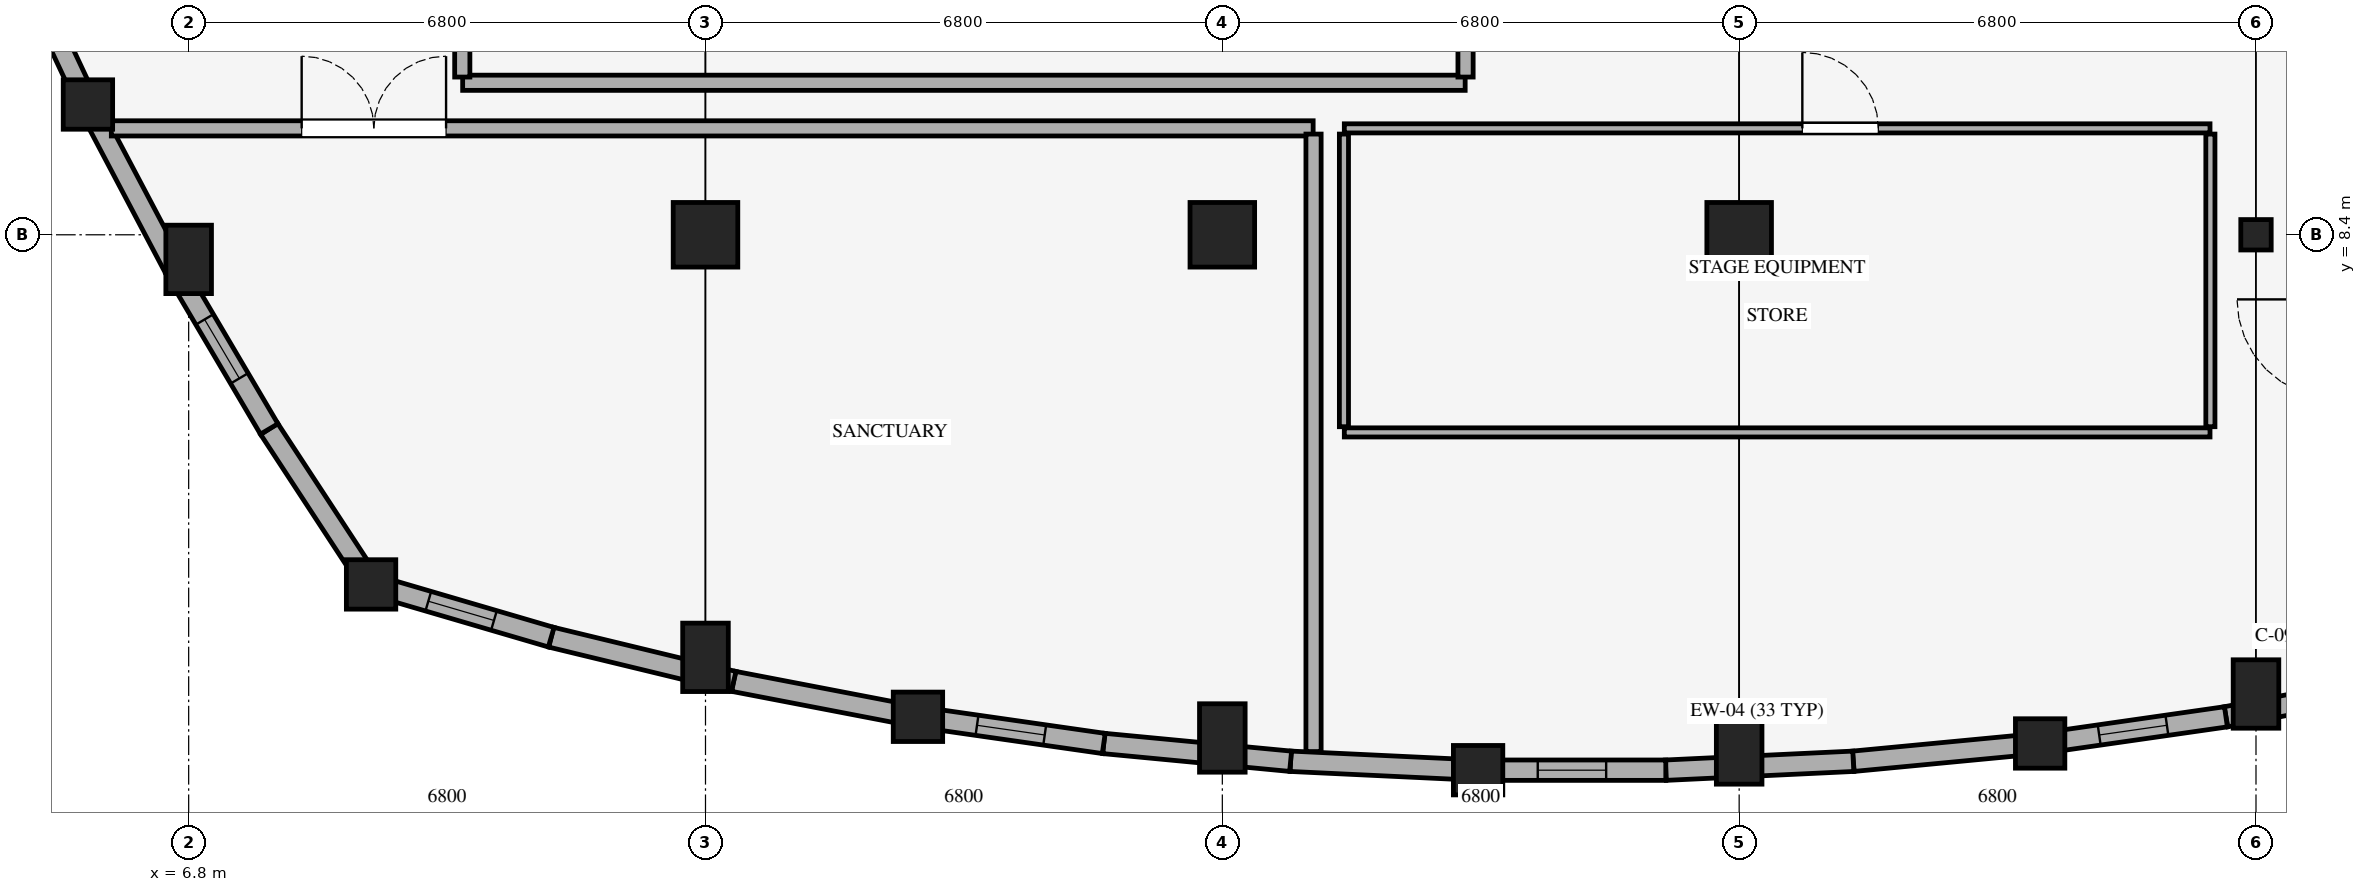
"""IFC4 building model, lengths in metres.
Left out: names, types, materials, properties, quantities, classifications, styles, units other than length and angle.
Written with IfcOpenShell. Run it as: python <this file> out.ifc"""

import sys

from ifc_helpers import new_model, si_unit, direction, frame, frame_2d, origin, origin_2d, place, context, subcontext, project, spatial, rectangle, circle, i_section, extrude, element, fill, save


model = new_model("IFC4")
c1 = context("Model", 3, precision=1e-05, world=origin(), true_north=direction((0.0, 1.0)))
c2 = subcontext(c1, "Body", "Model", "MODEL_VIEW")
j1 = project(units=[si_unit("LENGTHUNIT", "METRE"), si_unit("PLANEANGLEUNIT", "RADIAN")], contexts=[c1])
p1 = place(None, origin())
s1 = spatial("IfcSite", under=j1, at=p1, CompositionType="ELEMENT")
p2 = place(p1, origin())
s2 = spatial("IfcBuilding", under=s1, at=p2, CompositionType="ELEMENT")
p3 = place(p2, origin())
s3 = spatial("IfcBuildingStorey", under=s2, at=p3, CompositionType="ELEMENT", Elevation=0.0)
p4 = place(p3, frame((5.475, 10.114, 0.0), z_axis=(0.0, 0.0, 1.0), x_axis=(1.0, 0.0, 0.0)))
e1 = element("IfcColumn", 1, at=p4, inside=s3, PredefinedType="COLUMN", context=c2, shape_type="SweptSolid", body=[
    extrude(circle(Radius=0.325, at=origin_2d()), origin(), (0.0, 0.0, 1.0), 4.8),
])
p5 = place(p3, frame((6.8, 8.076, 0.0), z_axis=(0.0, 0.0, 1.0), x_axis=(1.0, 0.0, 0.0)))
e2 = element("IfcColumn", 2, at=p5, inside=s3, PredefinedType="COLUMN", context=c2, shape_type="SweptSolid", body=[
    extrude(rectangle(XDim=0.6, YDim=0.9, at=origin_2d()), origin(), (0.0, 0.0, 1.0), 4.8),
])
p6 = place(p3, frame((9.2, 3.8, 0.0), z_axis=(0.0, 0.0, 1.0), x_axis=(1.0, 0.0, 0.0)))
e3 = element("IfcColumn", 3, at=p6, inside=s3, PredefinedType="COLUMN", context=c2, shape_type="SweptSolid", body=[
    extrude(circle(Radius=0.325, at=origin_2d()), origin(), (0.0, 0.0, 1.0), 4.8),
])
p7 = place(p3, frame((13.6, 2.841, 0.0), z_axis=(0.0, 0.0, 1.0), x_axis=(1.0, 0.0, 0.0)))
e4 = element("IfcColumn", 4, at=p7, inside=s3, PredefinedType="COLUMN", context=c2, shape_type="SweptSolid", body=[
    extrude(rectangle(XDim=0.6, YDim=0.9, at=origin_2d()), origin(), (0.0, 0.0, 1.0), 4.8),
])
p8 = place(p3, frame((13.6, 8.4, 0.0), z_axis=(0.0, 0.0, 1.0), x_axis=(1.0, 0.0, 0.0)))
e5 = element("IfcColumn", 5, at=p8, inside=s3, PredefinedType="COLUMN", context=c2, shape_type="SweptSolid", body=[
    extrude(rectangle(XDim=0.85, YDim=0.85, at=origin_2d()), origin(), (0.0, 0.0, 1.0), 4.8),
])
p9 = place(p3, frame((16.396, 2.058, 0.0), z_axis=(0.0, 0.0, 1.0), x_axis=(1.0, 0.0, 0.0)))
e6 = element("IfcColumn", 6, at=p9, inside=s3, PredefinedType="COLUMN", context=c2, shape_type="SweptSolid", body=[
    extrude(circle(Radius=0.325, at=origin_2d()), origin(), (0.0, 0.0, 1.0), 4.8),
])
p10 = place(p3, frame((20.4, 1.78, 0.0), z_axis=(0.0, 0.0, 1.0), x_axis=(1.0, 0.0, 0.0)))
e7 = element("IfcColumn", 7, at=p10, inside=s3, PredefinedType="COLUMN", context=c2, shape_type="SweptSolid", body=[
    extrude(rectangle(XDim=0.6, YDim=0.9, at=origin_2d()), origin(), (0.0, 0.0, 1.0), 4.8),
])
p11 = place(p3, frame((20.4, 8.4, 0.0), z_axis=(0.0, 0.0, 1.0), x_axis=(1.0, 0.0, 0.0)))
e8 = element("IfcColumn", 8, at=p11, inside=s3, PredefinedType="COLUMN", context=c2, shape_type="SweptSolid", body=[
    extrude(rectangle(XDim=0.85, YDim=0.85, at=origin_2d()), origin(), (0.0, 0.0, 1.0), 4.8),
])
p12 = place(p3, frame((23.765, 1.356, 0.0), z_axis=(0.0, 0.0, 1.0), x_axis=(1.0, 0.0, 0.0)))
e9 = element("IfcColumn", 9, at=p12, inside=s3, PredefinedType="COLUMN", context=c2, shape_type="SweptSolid", body=[
    extrude(circle(Radius=0.325, at=origin_2d()), origin(), (0.0, 0.0, 1.0), 4.8),
])
p13 = place(p3, frame((27.2, 1.622, 0.0), z_axis=(0.0, 0.0, 1.0), x_axis=(1.0, 0.0, 0.0)))
e10 = element("IfcColumn", 10, at=p13, inside=s3, PredefinedType="COLUMN", context=c2, shape_type="SweptSolid", body=[
    extrude(rectangle(XDim=0.6, YDim=0.9, at=origin_2d()), origin(), (0.0, 0.0, 1.0), 4.8),
])
p14 = place(p3, frame((27.2, 8.4, 0.0), z_axis=(0.0, 0.0, 1.0), x_axis=(1.0, 0.0, 0.0)))
e11 = element("IfcColumn", 11, at=p14, inside=s3, PredefinedType="COLUMN", context=c2, shape_type="SweptSolid", body=[
    extrude(rectangle(XDim=0.85, YDim=0.85, at=origin_2d()), origin(), (0.0, 0.0, 1.0), 4.8),
])
p15 = place(p3, frame((31.16, 1.708, 0.0), z_axis=(0.0, 0.0, 1.0), x_axis=(1.0, 0.0, 0.0)))
e12 = element("IfcColumn", 12, at=p15, inside=s3, PredefinedType="COLUMN", context=c2, shape_type="SweptSolid", body=[
    extrude(circle(Radius=0.325, at=origin_2d()), origin(), (0.0, 0.0, 1.0), 4.8),
])
p16 = place(p3, frame((34.0, 2.358, 0.0), z_axis=(0.0, 0.0, 1.0), x_axis=(1.0, 0.0, 0.0)))
e13 = element("IfcColumn", 13, at=p16, inside=s3, PredefinedType="COLUMN", context=c2, shape_type="SweptSolid", body=[
    extrude(rectangle(XDim=0.6, YDim=0.9, at=origin_2d()), origin(), (0.0, 0.0, 1.0), 4.8),
])
p17 = place(p3, frame((34.0, 8.4, 0.0), z_axis=(0.0, 0.0, 1.0), x_axis=(1.0, 0.0, 0.0)))
e14 = element("IfcColumn", 14, at=p17, inside=s3, PredefinedType="COLUMN", context=c2, shape_type="SweptSolid", body=[
    extrude(i_section(OverallWidth=0.4, OverallDepth=0.4, WebThickness=0.013, FlangeThickness=0.021, FilletRadius=0.022, at=origin_2d()), origin(), (0.0, 0.0, 1.0), 4.8),
])
p18 = place(p3, frame((36.03, 2.525, 0.0), z_axis=(0.0, 0.0, 1.0), x_axis=(-0.982013497208, -0.188810728777, 0.0)))
e15 = element("IfcWall", 15, at=p18, inside=s3, PredefinedType="STANDARD", context=c2, shape_type="SweptSolid", body=[
    extrude(rectangle(XDim=2.47, YDim=0.268, at=frame_2d((1.235, 0.0))), origin(), (0.0, 0.0, 1.0), 3.62),
])
p19 = place(p3, frame((33.604, 2.058, 0.0), z_axis=(0.0, 0.0, 1.0), x_axis=(-0.989872236715, -0.141961103757, 0.0)))
e16 = element("IfcWall", 16, at=p19, inside=s3, PredefinedType="STANDARD", context=c2, shape_type="SweptSolid", body=[
    extrude(rectangle(XDim=2.469, YDim=0.268, at=frame_2d((1.235, 0.0))), origin(), (0.0, 0.0, 1.0), 3.62),
])
p20 = place(p19, frame((0.785, 0.0, 0.9)))
e17 = element("IfcOpeningElement", 17, at=p20, cuts=e16, PredefinedType="OPENING", context=c2, shape_type="SweptSolid", body=[
    extrude(rectangle(XDim=0.9, YDim=1.8, at=frame_2d((0.45, 0.9))), frame((0.0, 0.144, 0.0), z_axis=(0.0, -1.0, 0.0), x_axis=(1.0, 0.0, 0.0)), (0.0, 0.0, 1.0), 0.288),
])
p21 = place(p3, frame((31.16, 1.708, 0.0), z_axis=(0.0, 0.0, 1.0), x_axis=(-0.995485691749, -0.094911735433, 0.0)))
e18 = element("IfcWall", 18, at=p21, inside=s3, PredefinedType="STANDARD", context=c2, shape_type="SweptSolid", body=[
    extrude(rectangle(XDim=2.469, YDim=0.268, at=frame_2d((1.235, 0.0))), origin(), (0.0, 0.0, 1.0), 4.52),
])
p22 = place(p3, frame((28.702, 1.473, 0.0), z_axis=(0.0, 0.0, 1.0), x_axis=(-0.998873499285, -0.047452422769, 0.0)))
e19 = element("IfcWall", 19, at=p22, inside=s3, PredefinedType="STANDARD", context=c2, shape_type="SweptSolid", body=[
    extrude(rectangle(XDim=2.469, YDim=0.268, at=frame_2d((1.235, 0.0))), origin(), (0.0, 0.0, 1.0), 3.62),
])
p23 = place(p3, frame((26.235, 1.356, 0.0), z_axis=(0.0, 0.0, 1.0), x_axis=(-1.0, 0.0, 0.0)))
e20 = element("IfcWall", 20, at=p23, inside=s3, PredefinedType="STANDARD", context=c2, shape_type="SweptSolid", body=[
    extrude(rectangle(XDim=2.47, YDim=0.268, at=frame_2d((1.235, 0.0))), origin(), (0.0, 0.0, 1.0), 4.52),
])
p24 = place(p23, frame((0.785, 0.0, 0.9)))
e21 = element("IfcOpeningElement", 21, at=p24, cuts=e20, PredefinedType="OPENING", context=c2, shape_type="SweptSolid", body=[
    extrude(rectangle(XDim=0.9, YDim=1.8, at=frame_2d((0.45, 0.9))), frame((0.0, 0.144, 0.0), z_axis=(0.0, -1.0, 0.0), x_axis=(1.0, 0.0, 0.0)), (0.0, 0.0, 1.0), 0.288),
])
p25 = place(p3, frame((23.765, 1.356, 0.0), z_axis=(0.0, 0.0, 1.0), x_axis=(-0.998873499285, 0.047452422769, 0.0)))
e22 = element("IfcWall", 22, at=p25, inside=s3, PredefinedType="STANDARD", context=c2, shape_type="SweptSolid", body=[
    extrude(rectangle(XDim=2.469, YDim=0.268, at=frame_2d((1.235, 0.0))), origin(), (0.0, 0.0, 1.0), 4.52),
])
p26 = place(p3, frame((21.298, 1.473, 0.0), z_axis=(0.0, 0.0, 1.0), x_axis=(-0.995485691749, 0.094911735433, 0.0)))
e23 = element("IfcWall", 23, at=p26, inside=s3, PredefinedType="STANDARD", context=c2, shape_type="SweptSolid", body=[
    extrude(rectangle(XDim=2.469, YDim=0.268, at=frame_2d((1.235, 0.0))), origin(), (0.0, 0.0, 1.0), 3.62),
])
p27 = place(p3, frame((18.84, 1.708, 0.0), z_axis=(0.0, 0.0, 1.0), x_axis=(-0.989872236715, 0.141961103757, 0.0)))
e24 = element("IfcWall", 24, at=p27, inside=s3, PredefinedType="STANDARD", context=c2, shape_type="SweptSolid", body=[
    extrude(rectangle(XDim=2.469, YDim=0.268, at=frame_2d((1.235, 0.0))), origin(), (0.0, 0.0, 1.0), 4.52),
])
p28 = place(p27, frame((0.785, 0.0, 0.9)))
e25 = element("IfcOpeningElement", 25, at=p28, cuts=e24, PredefinedType="OPENING", context=c2, shape_type="SweptSolid", body=[
    extrude(rectangle(XDim=0.9, YDim=1.8, at=frame_2d((0.45, 0.9))), frame((0.0, 0.144, 0.0), z_axis=(0.0, -1.0, 0.0), x_axis=(1.0, 0.0, 0.0)), (0.0, 0.0, 1.0), 0.288),
])
p29 = place(p3, frame((16.396, 2.058, 0.0), z_axis=(0.0, 0.0, 1.0), x_axis=(-0.982013497208, 0.188810728777, 0.0)))
e26 = element("IfcWall", 26, at=p29, inside=s3, PredefinedType="STANDARD", context=c2, shape_type="SweptSolid", body=[
    extrude(rectangle(XDim=2.47, YDim=0.268, at=frame_2d((1.235, 0.0))), origin(), (0.0, 0.0, 1.0), 3.62),
])
p30 = place(p3, frame((13.97, 2.525, 0.0), z_axis=(0.0, 0.0, 1.0), x_axis=(-0.971924140736, 0.235294421214, 0.0)))
e27 = element("IfcWall", 27, at=p30, inside=s3, PredefinedType="STANDARD", context=c2, shape_type="SweptSolid", body=[
    extrude(rectangle(XDim=2.469, YDim=0.268, at=frame_2d((1.235, 0.0))), origin(), (0.0, 0.0, 1.0), 3.62),
])
p31 = place(p3, frame((11.57, 3.106, 0.0), z_axis=(0.0, 0.0, 1.0), x_axis=(-0.959667177702, 0.281138592232, 0.0)))
e28 = element("IfcWall", 28, at=p31, inside=s3, PredefinedType="STANDARD", context=c2, shape_type="SweptSolid", body=[
    extrude(rectangle(XDim=2.47, YDim=0.268, at=frame_2d((1.235, 0.0))), origin(), (0.0, 0.0, 1.0), 4.52),
])
p32 = place(p31, frame((0.785, 0.0, 0.9)))
e29 = element("IfcOpeningElement", 29, at=p32, cuts=e28, PredefinedType="OPENING", context=c2, shape_type="SweptSolid", body=[
    extrude(rectangle(XDim=0.9, YDim=1.8, at=frame_2d((0.45, 0.9))), frame((0.0, 0.144, 0.0), z_axis=(0.0, -1.0, 0.0), x_axis=(1.0, 0.0, 0.0)), (0.0, 0.0, 1.0), 0.288),
])
p33 = place(p3, frame((9.2, 3.8, 0.0), z_axis=(0.0, 0.0, 1.0), x_axis=(-0.548093698086, 0.836416940358, 0.0)))
e30 = element("IfcWall", 30, at=p33, inside=s3, PredefinedType="STANDARD", context=c2, shape_type="SweptSolid", body=[
    extrude(rectangle(XDim=2.446, YDim=0.268, at=frame_2d((1.223, 0.0))), origin(), (0.0, 0.0, 1.0), 4.52),
])
p34 = place(p3, frame((7.86, 5.845, 0.0), z_axis=(0.0, 0.0, 1.0), x_axis=(-0.508154045832, 0.861266199095, 0.0)))
e31 = element("IfcWall", 31, at=p34, inside=s3, PredefinedType="STANDARD", context=c2, shape_type="SweptSolid", body=[
    extrude(rectangle(XDim=2.446, YDim=0.268, at=frame_2d((1.223, 0.0))), origin(), (0.0, 0.0, 1.0), 3.62),
])
p35 = place(p34, frame((0.773, 0.0, 0.9)))
e32 = element("IfcOpeningElement", 32, at=p35, cuts=e31, PredefinedType="OPENING", context=c2, shape_type="SweptSolid", body=[
    extrude(rectangle(XDim=0.9, YDim=1.8, at=frame_2d((0.45, 0.9))), frame((0.0, 0.144, 0.0), z_axis=(0.0, -1.0, 0.0), x_axis=(1.0, 0.0, 0.0)), (0.0, 0.0, 1.0), 0.288),
])
p36 = place(p3, frame((6.617, 7.952, 0.0), z_axis=(0.0, 0.0, 1.0), x_axis=(-0.467149014597, 0.884178600827, 0.0)))
e33 = element("IfcWall", 33, at=p36, inside=s3, PredefinedType="STANDARD", context=c2, shape_type="SweptSolid", body=[
    extrude(rectangle(XDim=2.445, YDim=0.268, at=frame_2d((1.223, 0.0))), origin(), (0.0, 0.0, 1.0), 3.62),
])
p37 = place(p3, frame((5.475, 10.114, 0.0), z_axis=(0.0, 0.0, 1.0), x_axis=(-0.424993953285, 0.905196188498, 0.0)))
e34 = element("IfcWall", 34, at=p37, inside=s3, PredefinedType="STANDARD", context=c2, shape_type="SweptSolid", body=[
    extrude(rectangle(XDim=2.446, YDim=0.268, at=frame_2d((1.223, 0.0))), origin(), (0.0, 0.0, 1.0), 3.82),
])
p38 = place(p3, frame((23.595, 10.4, 0.0), z_axis=(0.0, 0.0, 1.0), x_axis=(-1.0, 0.0, 0.0)))
e35 = element("IfcWall", 35, at=p38, inside=s3, PredefinedType="STANDARD", context=c2, shape_type="SweptSolid", body=[
    extrude(rectangle(XDim=13.19, YDim=0.2, at=frame_2d((6.595, 0.0))), origin(), (0.0, 0.0, 1.0), 4.49),
])
p39 = place(p3, frame((10.4, 10.475, 0.0), z_axis=(0.0, 0.0, 1.0), x_axis=(0.0, 1.0, 0.0)))
e36 = element("IfcWall", 36, at=p39, inside=s3, PredefinedType="STANDARD", context=c2, shape_type="SweptSolid", body=[
    extrude(rectangle(XDim=36.05, YDim=0.2, at=frame_2d((18.025, 0.0))), origin(), (0.0, 0.0, 1.0), 4.49),
])
p40 = place(p39, frame((3.415, 0.0, 0.0)))
e37 = element("IfcOpeningElement", 37, at=p40, cuts=e36, PredefinedType="OPENING", context=c2, shape_type="SweptSolid", body=[
    extrude(rectangle(XDim=1.9, YDim=2.35, at=frame_2d((0.95, 1.175))), frame((0.0, 0.11, 0.0), z_axis=(0.0, -1.0, 0.0), x_axis=(1.0, 0.0, 0.0)), (0.0, 0.0, 1.0), 0.22),
])
p41 = place(p3, frame((23.6, 46.525, 0.0), z_axis=(0.0, 0.0, 1.0), x_axis=(0.0, -1.0, 0.0)))
e38 = element("IfcWall", 38, at=p41, inside=s3, PredefinedType="STANDARD", context=c2, shape_type="SweptSolid", body=[
    extrude(rectangle(XDim=36.05, YDim=0.2, at=frame_2d((18.025, 0.0))), origin(), (0.0, 0.0, 1.0), 4.49),
])
p42 = place(p41, frame((21.173, 0.0, 0.0)))
e39 = element("IfcOpeningElement", 39, at=p42, cuts=e38, PredefinedType="OPENING", context=c2, shape_type="SweptSolid", body=[
    extrude(rectangle(XDim=1.9, YDim=2.35, at=frame_2d((0.95, 1.175))), frame((0.0, 0.11, 0.0), z_axis=(0.0, -1.0, 0.0), x_axis=(1.0, 0.0, 0.0)), (0.0, 0.0, 1.0), 0.22),
])
p43 = place(p3, frame((33.4, 9.725, 0.0), z_axis=(0.0, 0.0, 1.0), x_axis=(0.0, -1.0, 0.0)))
e40 = element("IfcWall", 40, at=p43, inside=s3, PredefinedType="STANDARD", context=c2, shape_type="SweptSolid", body=[
    extrude(rectangle(XDim=3.85, YDim=0.12, at=frame_2d((1.925, 0.0))), origin(), (0.0, 0.0, 1.0), 4.49),
])
p44 = place(p3, frame((33.395, 5.8, 0.0), z_axis=(0.0, 0.0, 1.0), x_axis=(-1.0, 0.0, 0.0)))
e41 = element("IfcWall", 41, at=p44, inside=s3, PredefinedType="STANDARD", context=c2, shape_type="SweptSolid", body=[
    extrude(rectangle(XDim=11.39, YDim=0.12, at=frame_2d((5.695, 0.0))), origin(), (0.0, 0.0, 1.0), 3.62),
])
p45 = place(p3, frame((22.0, 5.875, 0.0), z_axis=(0.0, 0.0, 1.0), x_axis=(0.0, 1.0, 0.0)))
e42 = element("IfcWall", 42, at=p45, inside=s3, PredefinedType="STANDARD", context=c2, shape_type="SweptSolid", body=[
    extrude(rectangle(XDim=3.85, YDim=0.12, at=frame_2d((1.925, 0.0))), origin(), (0.0, 0.0, 1.0), 4.49),
])
p46 = place(p3, frame((22.005, 9.8, 0.0), z_axis=(0.0, 0.0, 1.0), x_axis=(1.0, 0.0, 0.0)))
e43 = element("IfcWall", 43, at=p46, inside=s3, PredefinedType="STANDARD", context=c2, shape_type="SweptSolid", body=[
    extrude(rectangle(XDim=11.39, YDim=0.12, at=frame_2d((5.695, 0.0))), origin(), (0.0, 0.0, 1.0), 4.49),
])
p47 = place(p46, frame((6.026, 0.0, 0.0)))
e44 = element("IfcOpeningElement", 44, at=p47, cuts=e43, PredefinedType="OPENING", context=c2, shape_type="SweptSolid", body=[
    extrude(rectangle(XDim=1.0, YDim=2.1, at=frame_2d((0.5, 1.05))), frame((0.0, 0.07, 0.0), z_axis=(0.0, -1.0, 0.0), x_axis=(1.0, 0.0, 0.0)), (0.0, 0.0, 1.0), 0.14),
])
p48 = place(p3, frame((5.782, 9.8, 0.0), z_axis=(0.0, 0.0, 1.0), x_axis=(1.0, 0.0, 0.0)))
e45 = element("IfcWall", 45, at=p48, inside=s3, PredefinedType="STANDARD", context=c2, shape_type="SweptSolid", body=[
    extrude(rectangle(XDim=15.812, YDim=0.2, at=frame_2d((7.906, 0.0))), origin(), (0.0, 0.0, 1.0), 3.62),
])
p49 = place(p48, frame((2.504, 0.0, 0.0)))
e46 = element("IfcOpeningElement", 46, at=p49, cuts=e45, PredefinedType="OPENING", context=c2, shape_type="SweptSolid", body=[
    extrude(rectangle(XDim=1.9, YDim=2.35, at=frame_2d((0.95, 1.175))), frame((0.0, 0.11, 0.0), z_axis=(0.0, -1.0, 0.0), x_axis=(1.0, 0.0, 0.0)), (0.0, 0.0, 1.0), 0.22),
])
p50 = place(p3, frame((21.6, 9.725, 0.0), z_axis=(0.0, 0.0, 1.0), x_axis=(0.0, -1.0, 0.0)))
e47 = element("IfcWall", 47, at=p50, inside=s3, PredefinedType="STANDARD", context=c2, shape_type="SweptSolid", body=[
    extrude(rectangle(XDim=8.124, YDim=0.2, at=frame_2d((4.062, 0.0))), origin(), (0.0, 0.0, 1.0), 4.49),
])
p51 = place(p20, origin())
e48 = element("IfcWindow", 48, at=p51, inside=s3, PartitioningType="SINGLE_PANEL", PredefinedType="WINDOW", context=c2, shape_type="SweptSolid", body=[
    extrude(rectangle(XDim=0.9, YDim=1.8, at=frame_2d((0.45, 0.9))), frame((0.0, 0.03, 0.0), z_axis=(0.0, -1.0, 0.0), x_axis=(1.0, 0.0, 0.0)), (0.0, 0.0, 1.0), 0.06),
])
fill(e17, e48)
p52 = place(p24, origin())
e49 = element("IfcWindow", 49, at=p52, inside=s3, PartitioningType="SINGLE_PANEL", PredefinedType="WINDOW", context=c2, shape_type="SweptSolid", body=[
    extrude(rectangle(XDim=0.9, YDim=1.8, at=frame_2d((0.45, 0.9))), frame((0.0, 0.03, 0.0), z_axis=(0.0, -1.0, 0.0), x_axis=(1.0, 0.0, 0.0)), (0.0, 0.0, 1.0), 0.06),
])
fill(e21, e49)
p53 = place(p28, origin())
e50 = element("IfcWindow", 50, at=p53, inside=s3, PartitioningType="SINGLE_PANEL", PredefinedType="WINDOW", context=c2, shape_type="SweptSolid", body=[
    extrude(rectangle(XDim=0.9, YDim=1.8, at=frame_2d((0.45, 0.9))), frame((0.0, 0.03, 0.0), z_axis=(0.0, -1.0, 0.0), x_axis=(1.0, 0.0, 0.0)), (0.0, 0.0, 1.0), 0.06),
])
fill(e25, e50)
p54 = place(p32, origin())
e51 = element("IfcWindow", 51, at=p54, inside=s3, PartitioningType="SINGLE_PANEL", PredefinedType="WINDOW", context=c2, shape_type="SweptSolid", body=[
    extrude(rectangle(XDim=0.9, YDim=1.8, at=frame_2d((0.45, 0.9))), frame((0.0, 0.03, 0.0), z_axis=(0.0, -1.0, 0.0), x_axis=(1.0, 0.0, 0.0)), (0.0, 0.0, 1.0), 0.06),
])
fill(e29, e51)
p55 = place(p35, origin())
e52 = element("IfcWindow", 52, at=p55, inside=s3, PartitioningType="SINGLE_PANEL", PredefinedType="WINDOW", context=c2, shape_type="SweptSolid", body=[
    extrude(rectangle(XDim=0.9, YDim=1.8, at=frame_2d((0.45, 0.9))), frame((0.0, 0.03, 0.0), z_axis=(0.0, -1.0, 0.0), x_axis=(1.0, 0.0, 0.0)), (0.0, 0.0, 1.0), 0.06),
])
fill(e32, e52)
p56 = place(p47, origin())
e53 = element("IfcDoor", 53, at=p56, inside=s3, OperationType="SINGLE_SWING_LEFT", PredefinedType="DOOR", context=c2, shape_type="SweptSolid", body=[
    extrude(rectangle(XDim=1.0, YDim=2.1, at=frame_2d((0.5, 1.05))), frame((0.0, 0.025, 0.0), z_axis=(0.0, -1.0, 0.0), x_axis=(1.0, 0.0, 0.0)), (0.0, 0.0, 1.0), 0.05),
])
fill(e44, e53)
p57 = place(p49, origin())
e54 = element("IfcDoor", 54, at=p57, inside=s3, OperationType="DOUBLE_DOOR_SINGLE_SWING", PredefinedType="DOOR", context=c2, shape_type="SweptSolid", body=[
    extrude(rectangle(XDim=1.9, YDim=2.35, at=frame_2d((0.95, 1.175))), frame((0.0, 0.025, 0.0), z_axis=(0.0, -1.0, 0.0), x_axis=(1.0, 0.0, 0.0)), (0.0, 0.0, 1.0), 0.05),
])
fill(e46, e54)
save(model, sys.argv[1])
